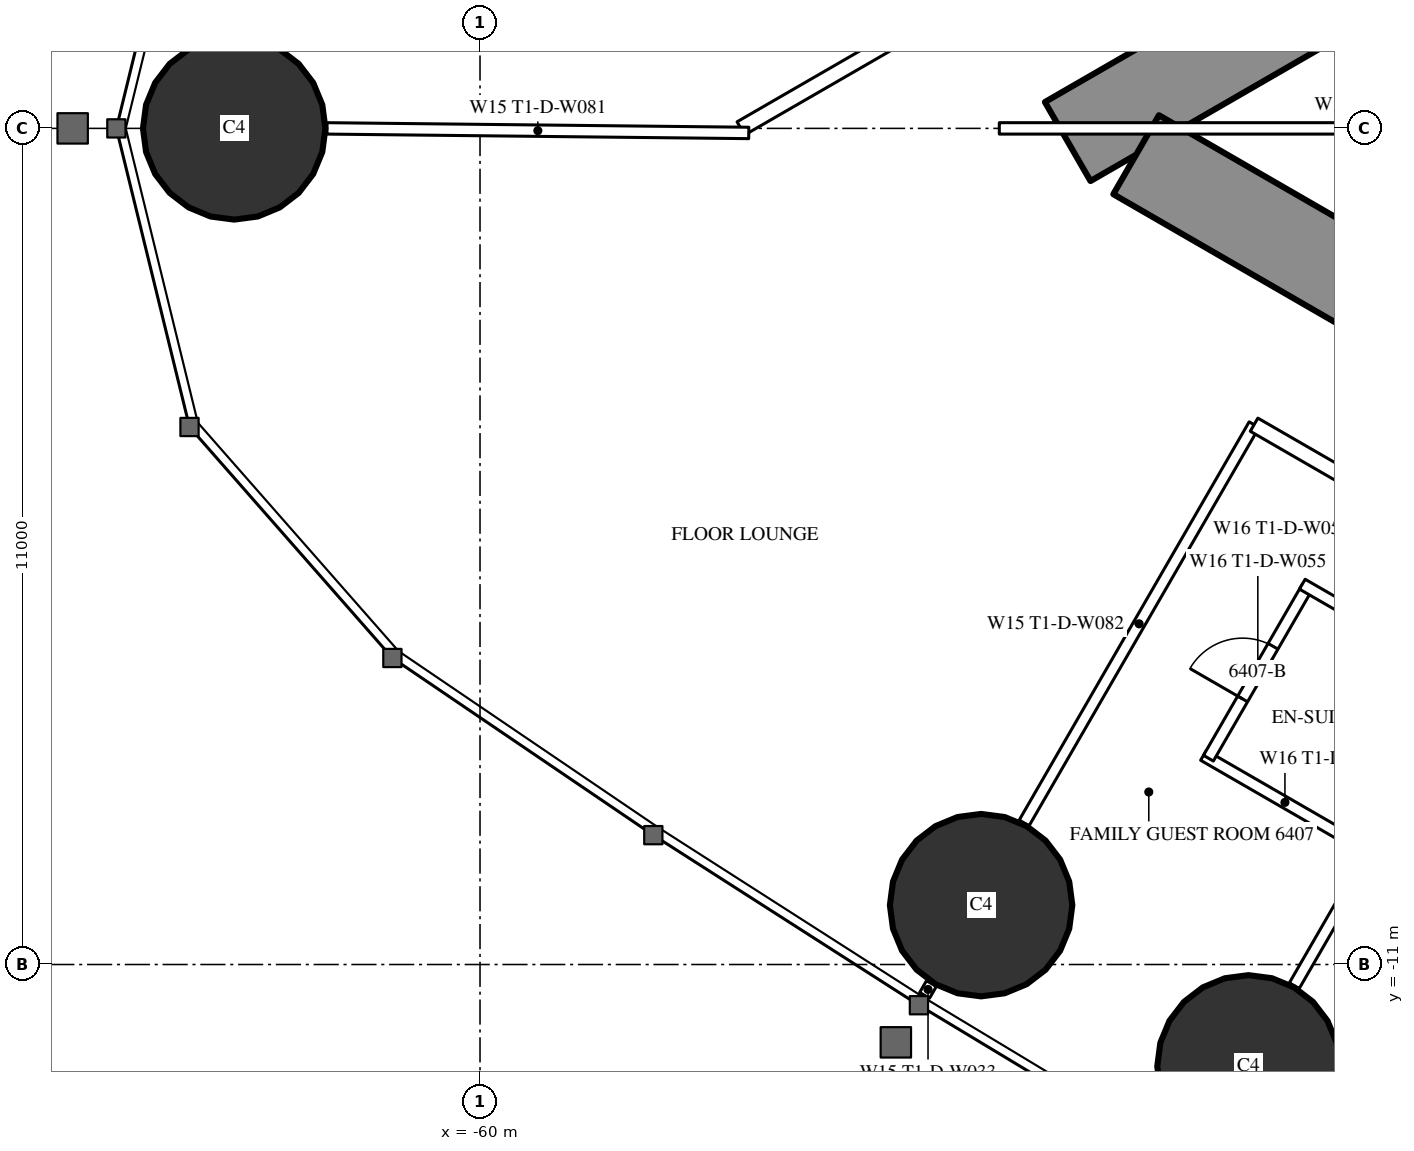
"""IFC4 building model, lengths in metres.
Left out: names, types, materials, properties, quantities, classifications, styles, units other than length and angle.
Written with IfcOpenShell. Run it as: python <this file> out.ifc"""

import sys

from ifc_helpers import new_model, si_unit, direction, frame, frame_2d, origin, origin_2d, place, context, subcontext, project, spatial, rectangle, circle, extrude, element, fill, save


model = new_model("IFC4")
c1 = context("Model", 3, precision=1e-05, world=origin(), true_north=direction((0.0, 1.0)))
c2 = subcontext(c1, "Body", "Model", "MODEL_VIEW")
j1 = project(units=[si_unit("LENGTHUNIT", "METRE"), si_unit("PLANEANGLEUNIT", "RADIAN")], contexts=[c1])
p1 = place(None, origin())
s1 = spatial("IfcSite", under=j1, at=p1, CompositionType="ELEMENT")
p2 = place(p1, origin())
s2 = spatial("IfcBuilding", under=s1, at=p2, CompositionType="ELEMENT")
p3 = place(p2, frame((0.0, 0.0, 240.5)))
s3 = spatial("IfcBuildingStorey", under=s2, at=p3, CompositionType="ELEMENT", Elevation=240.5)
for number, where, z_axis, x_axis in (
    (1, (-63.234, 0.0, 0.0), (0.0, 0.0, 1.0), (1.0, 0.0, 0.0)),
    (2, (-53.408, -10.219, 0.0), (0.0, 0.0, 1.0), (1.0, 0.0, 0.0)),
    (3, (-49.89, -12.34, 0.0), (0.0, 0.0, 1.0), (1.0, 0.0, 0.0)),
):
    element("IfcColumn", number, at=place(p3, frame(where, z_axis=z_axis, x_axis=x_axis)), inside=s3, PredefinedType="COLUMN", context=c2, shape_type="SweptSolid", body=[
        extrude(circle(Radius=1.2, at=origin_2d()), origin(), (0.0, 0.0, 1.0), 3.6),
    ])
p4 = place(p3, frame((-27.2, 14.3, 0.0), z_axis=(0.0, 0.0, 1.0), x_axis=(-0.866026593062, -0.499997940104, 0.0)))
e4 = element("IfcWall", 4, at=p4, inside=s3, PredefinedType="SHEAR", context=c2, shape_type="SweptSolid", body=[
    extrude(rectangle(XDim=28.946, YDim=1.2, at=frame_2d((14.473, 0.0))), origin(), (0.0, 0.0, 1.0), 3.6),
])
p5 = place(p4, frame((4.6, 0.0, 0.0)))
e5 = element("IfcOpeningElement", 5, at=p5, cuts=e4, PredefinedType="OPENING", context=c2, shape_type="SweptSolid", body=[
    extrude(rectangle(XDim=1.0, YDim=2.2, at=frame_2d((0.5, 1.1))), frame((0.0, 0.61, 0.0), z_axis=(0.0, -1.0, 0.0), x_axis=(1.0, 0.0, 0.0)), (0.0, 0.0, 1.0), 1.22),
])
p6 = place(p4, frame((13.395, 0.0, 0.0)))
e6 = element("IfcOpeningElement", 6, at=p6, cuts=e4, PredefinedType="OPENING", context=c2, shape_type="SweptSolid", body=[
    extrude(rectangle(XDim=1.8, YDim=2.2, at=frame_2d((0.9, 1.1))), frame((0.0, 0.61, 0.0), z_axis=(0.0, -1.0, 0.0), x_axis=(1.0, 0.0, 0.0)), (0.0, 0.0, 1.0), 1.22),
])
p7 = place(p3, frame((-27.2, -14.3, 0.0), z_axis=(0.0, 0.0, 1.0), x_axis=(-0.866024021859, 0.500002393557, 0.0)))
e7 = element("IfcWall", 7, at=p7, inside=s3, PredefinedType="SHEAR", context=c2, shape_type="SweptSolid", body=[
    extrude(rectangle(XDim=27.907, YDim=1.2, at=frame_2d((13.954, 0.0))), origin(), (0.0, 0.0, 1.0), 3.6),
])
p8 = place(p7, frame((4.6, 0.0, 0.0)))
e8 = element("IfcOpeningElement", 8, at=p8, cuts=e7, PredefinedType="OPENING", context=c2, shape_type="SweptSolid", body=[
    extrude(rectangle(XDim=1.0, YDim=2.2, at=frame_2d((0.5, 1.1))), frame((0.0, 0.61, 0.0), z_axis=(0.0, -1.0, 0.0), x_axis=(1.0, 0.0, 0.0)), (0.0, 0.0, 1.0), 1.22),
])
p9 = place(p7, frame((13.395, 0.0, 0.0)))
e9 = element("IfcOpeningElement", 9, at=p9, cuts=e7, PredefinedType="OPENING", context=c2, shape_type="SweptSolid", body=[
    extrude(rectangle(XDim=1.8, YDim=2.2, at=frame_2d((0.9, 1.1))), frame((0.0, 0.61, 0.0), z_axis=(0.0, -1.0, 0.0), x_axis=(1.0, 0.0, 0.0)), (0.0, 0.0, 1.0), 1.22),
])
p10 = place(p3, frame((-28.737, 16.068, 0.0), z_axis=(0.0, 0.0, 1.0), x_axis=(-0.866026057212, -0.499998868229, 0.0)))
e10 = element("IfcWall", 10, at=p10, inside=s3, PredefinedType="PARTITIONING", context=c2, shape_type="SweptSolid", body=[
    extrude(rectangle(XDim=32.137, YDim=0.2, at=frame_2d((16.068, 0.0))), origin(), (0.0, 0.0, 1.0), 3.35),
])
p11 = place(p10, frame((1.08, 0.0, 0.0)))
e11 = element("IfcOpeningElement", 11, at=p11, cuts=e10, PredefinedType="OPENING", context=c2, shape_type="SweptSolid", body=[
    extrude(rectangle(XDim=1.8, YDim=2.03, at=frame_2d((0.9, 1.015))), frame((0.0, 0.11, 0.0), z_axis=(0.0, -1.0, 0.0), x_axis=(1.0, 0.0, 0.0)), (0.0, 0.0, 1.0), 0.22),
])
p12 = place(p10, frame((6.86, 0.0, 0.0)))
e12 = element("IfcOpeningElement", 12, at=p12, cuts=e10, PredefinedType="OPENING", context=c2, shape_type="SweptSolid", body=[
    extrude(rectangle(XDim=1.0, YDim=2.2, at=frame_2d((0.5, 1.1))), frame((0.0, 0.11, 0.0), z_axis=(0.0, -1.0, 0.0), x_axis=(1.0, 0.0, 0.0)), (0.0, 0.0, 1.0), 0.22),
])
p13 = place(p10, frame((16.418, 0.0, 0.0)))
e13 = element("IfcOpeningElement", 13, at=p13, cuts=e10, PredefinedType="OPENING", context=c2, shape_type="SweptSolid", body=[
    extrude(rectangle(XDim=0.95, YDim=2.2, at=frame_2d((0.475, 1.1))), frame((0.0, 0.11, 0.0), z_axis=(0.0, -1.0, 0.0), x_axis=(1.0, 0.0, 0.0)), (0.0, 0.0, 1.0), 0.22),
])
p14 = place(p10, frame((20.567, 0.0, 0.0)))
e14 = element("IfcOpeningElement", 14, at=p14, cuts=e10, PredefinedType="OPENING", context=c2, shape_type="SweptSolid", body=[
    extrude(rectangle(XDim=0.95, YDim=2.2, at=frame_2d((0.475, 1.1))), frame((0.0, 0.11, 0.0), z_axis=(0.0, -1.0, 0.0), x_axis=(1.0, 0.0, 0.0)), (0.0, 0.0, 1.0), 0.22),
])
p15 = place(p10, frame((27.065, 0.0, 0.0)))
e15 = element("IfcOpeningElement", 15, at=p15, cuts=e10, PredefinedType="OPENING", context=c2, shape_type="SweptSolid", body=[
    extrude(rectangle(XDim=0.95, YDim=2.2, at=frame_2d((0.475, 1.1))), frame((0.0, 0.11, 0.0), z_axis=(0.0, -1.0, 0.0), x_axis=(1.0, 0.0, 0.0)), (0.0, 0.0, 1.0), 0.22),
])
p16 = place(p3, frame((-46.274, -6.059, 0.0), z_axis=(0.0, 0.0, 1.0), x_axis=(-0.500020471368, -0.866013584312, 0.0)))
e16 = element("IfcWall", 16, at=p16, inside=s3, PredefinedType="PARTITIONING", context=c2, shape_type="SweptSolid", body=[
    extrude(rectangle(XDim=6.028, YDim=0.15, at=frame_2d((3.014, 0.0))), origin(), (0.0, 0.0, 1.0), 2.45),
])
p17 = place(p3, frame((-49.816, -3.898, 0.0), z_axis=(0.0, 0.0, 1.0), x_axis=(-0.500001913541, -0.866024298998, 0.0)))
e17 = element("IfcWall", 17, at=p17, inside=s3, PredefinedType="PARTITIONING", context=c2, shape_type="SweptSolid", body=[
    extrude(rectangle(XDim=6.05, YDim=0.15, at=frame_2d((3.025, 0.0))), origin(), (0.0, 0.0, 1.0), 2.45),
])
p18 = place(p3, frame((-54.061, -11.25, 0.0), z_axis=(0.0, 0.0, 1.0), x_axis=(-0.500391173478, -0.865799441849, 0.0)))
e18 = element("IfcWall", 18, at=p18, inside=s3, PredefinedType="PARTITIONING", context=c2, shape_type="SweptSolid", body=[
    extrude(rectangle(XDim=0.179, YDim=0.15, at=frame_2d((0.089, 0.0))), origin(), (0.0, 0.0, 1.0), 2.45),
])
p19 = place(p3, frame((-56.464, -0.06, 0.0), z_axis=(0.0, 0.0, 1.0), x_axis=(-0.999941455167, 0.01082063951, 0.0)))
e19 = element("IfcWall", 19, at=p19, inside=s3, PredefinedType="PARTITIONING", context=c2, shape_type="SweptSolid", body=[
    extrude(rectangle(XDim=5.55, YDim=0.15, at=frame_2d((2.775, 0.0))), origin(), (0.0, 0.0, 1.0), 2.45),
])
p20 = place(p3, frame((-48.339, -9.486, 0.0), z_axis=(0.0, 0.0, 1.0), x_axis=(-0.866006523861, 0.500032699561, 0.0)))
e20 = element("IfcWall", 20, at=p20, inside=s3, PredefinedType="PARTITIONING", context=c2, shape_type="SweptSolid", body=[
    extrude(rectangle(XDim=2.475, YDim=0.15, at=frame_2d((1.237, 0.0))), origin(), (0.0, 0.0, 1.0), 3.35),
])
p21 = place(p3, frame((-49.117, -6.034, 0.0), z_axis=(0.0, 0.0, 1.0), x_axis=(-0.500006934395, -0.866021400173, 0.0)))
e21 = element("IfcWall", 21, at=p21, inside=s3, PredefinedType="PARTITIONING", context=c2, shape_type="SweptSolid", body=[
    extrude(rectangle(XDim=2.6, YDim=0.15, at=frame_2d((1.3, 0.0))), origin(), (0.0, 0.0, 1.0), 3.35),
])
p22 = place(p21, frame((0.9, 0.0, 0.0)))
e22 = element("IfcOpeningElement", 22, at=p22, cuts=e21, PredefinedType="OPENING", context=c2, shape_type="SweptSolid", body=[
    extrude(rectangle(XDim=0.8, YDim=2.2, at=frame_2d((0.4, 1.1))), frame((0.0, 0.085, 0.0), z_axis=(0.0, -1.0, 0.0), x_axis=(1.0, 0.0, 0.0)), (0.0, 0.0, 1.0), 0.17),
])
p23 = place(p3, frame((-47.039, -7.234, 0.0), z_axis=(0.0, 0.0, 1.0), x_axis=(-0.866073894602, 0.499916002032, 0.0)))
e23 = element("IfcWall", 23, at=p23, inside=s3, PredefinedType="PARTITIONING", context=c2, shape_type="SweptSolid", body=[
    extrude(rectangle(XDim=2.475, YDim=0.15, at=frame_2d((1.238, 0.0))), origin(), (0.0, 0.0, 1.0), 2.5),
])
p24 = place(p3, frame((-44.715, -6.844, 0.0), z_axis=(0.0, 0.0, 1.0), x_axis=(-0.866020627653, 0.50000827241, 0.0)))
e24 = element("IfcWall", 24, at=p24, inside=s3, PredefinedType="PARTITIONING", context=c2, shape_type="SweptSolid", body=[
    extrude(rectangle(XDim=5.891, YDim=0.2, at=frame_2d((2.945, 0.0))), origin(), (0.0, 0.0, 1.0), 3.35),
])
p25 = place(p24, frame((2.117, 0.0, 0.0)))
e25 = element("IfcOpeningElement", 25, at=p25, cuts=e24, PredefinedType="OPENING", context=c2, shape_type="SweptSolid", body=[
    extrude(rectangle(XDim=0.95, YDim=2.2, at=frame_2d((0.475, 1.1))), frame((0.0, 0.11, 0.0), z_axis=(0.0, -1.0, 0.0), x_axis=(1.0, 0.0, 0.0)), (0.0, 0.0, 1.0), 0.22),
])
p26 = place(p24, frame((0.5, 0.0, 0.0)))
e26 = element("IfcOpeningElement", 26, at=p26, cuts=e24, PredefinedType="OPENING", context=c2, shape_type="SweptSolid", body=[
    extrude(rectangle(XDim=0.967, YDim=2.2, at=frame_2d((0.483, 1.1))), frame((0.0, 0.11, 0.0), z_axis=(0.0, -1.0, 0.0), x_axis=(1.0, 0.0, 0.0)), (0.0, 0.0, 1.0), 0.22),
])
p27 = place(p3, frame((-43.075, 0.0, 0.0), z_axis=(0.0, 0.0, 1.0), x_axis=(-1.0, 0.0, 0.0)))
e27 = element("IfcWall", 27, at=p27, inside=s3, PredefinedType="PARTITIONING", context=c2, shape_type="SweptSolid", body=[
    extrude(rectangle(XDim=10.093, YDim=0.15, at=frame_2d((5.047, 0.0))), origin(), (0.0, 0.0, 1.0), 2.45),
])
p28 = place(p22, origin())
e28 = element("IfcDoor", 28, at=p28, inside=s3, OperationType="SINGLE_SWING_RIGHT", PredefinedType="DOOR", context=c2, shape_type="SweptSolid", body=[
    extrude(rectangle(XDim=0.8, YDim=2.2, at=frame_2d((0.4, 1.1))), frame((0.0, 0.025, 0.0), z_axis=(0.0, -1.0, 0.0), x_axis=(1.0, 0.0, 0.0)), (0.0, 0.0, 1.0), 0.05),
])
fill(e22, e28)
save(model, sys.argv[1])
